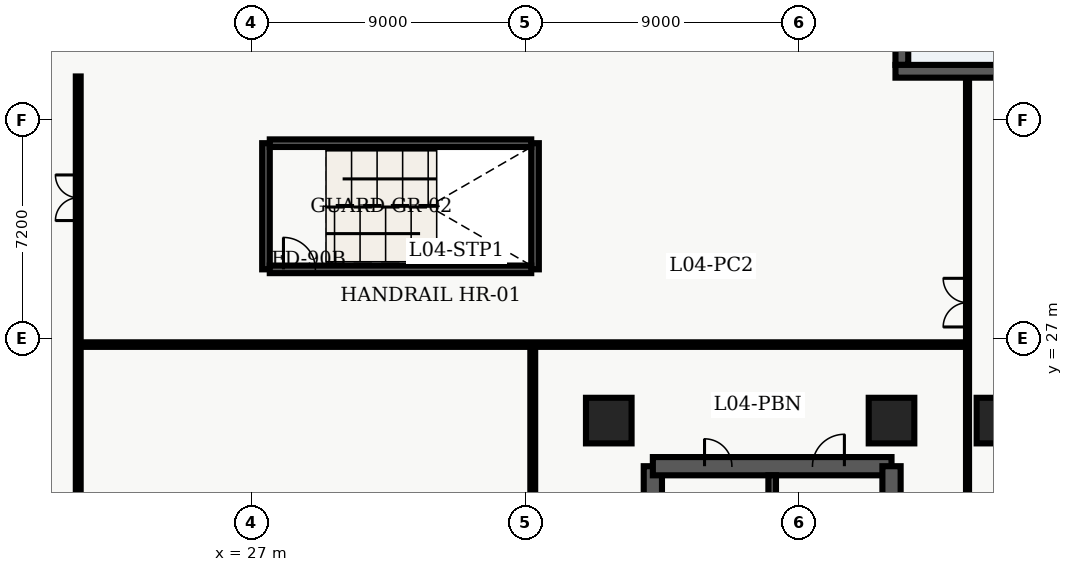
"""IFC4 building model, lengths in metres.
Left out: names, types, materials, properties, quantities, classifications, styles, units other than length and angle.
Written with IfcOpenShell. Run it as: python <this file> out.ifc"""

import sys

from ifc_helpers import new_model, entity, si_unit, converted_unit, direction, frame, origin_with_axes, origin_2d_with_axis, place, context, subcontext, project, spatial, polyline, rectangle, outline, extrude, element, fill, save


model = new_model("IFC4")
c1 = context("Model", 3, precision=1e-05, world=origin_with_axes(), true_north=direction((0.0, 1.0)))
c2 = subcontext(c1, "Body", "Model", "MODEL_VIEW")
j1 = project(units=[si_unit("LENGTHUNIT", "METRE"), converted_unit("PLANEANGLEUNIT", "DEGREE", entity("IfcPlaneAngleMeasure", 0.017), si_unit("PLANEANGLEUNIT", "RADIAN"), dimensions=[0, 0, 0, 0, 0, 0, 0])], contexts=[c1])
p1 = place(None, origin_with_axes())
s1 = spatial("IfcSite", under=j1, at=p1, CompositionType="ELEMENT")
p2 = place(p1, origin_with_axes())
s2 = spatial("IfcBuilding", under=s1, at=p2, CompositionType="ELEMENT")
p3 = place(p2, frame((0.0, 0.0, 19.8), z_axis=(0.0, 0.0, 1.0), x_axis=(1.0, 0.0, 0.0)))
s3 = spatial("IfcBuildingStorey", under=s2, at=p3, CompositionType="ELEMENT", Elevation=19.8)
p4 = place(p3, frame((40.2, 7.2, 0.0), z_axis=(0.0, 0.0, 1.0), x_axis=(0.0, 1.0, 0.0)))
e1 = element("IfcWall", 1, at=p4, inside=s3, PredefinedType="SHEAR", context=c2, shape_type="SweptSolid", body=[
    extrude(outline(polyline([(0.0, -0.3), (15.6, -0.3), (15.6, 0.3), (0.0, 0.3), (0.0, -0.3)])), origin_with_axes(), (0.0, 0.0, 1.0), 4.26),
])
p5 = place(p4, frame((12.75, 0.0, 0.0), z_axis=(0.0, 0.0, 1.0), x_axis=(1.0, 0.0, 0.0)))
e2 = element("IfcOpeningElement", 2, at=p5, cuts=e1, PredefinedType="OPENING", context=c2, shape_type="SweptSolid", body=[
    extrude(rectangle(XDim=1.2, YDim=0.62, at=origin_2d_with_axis()), origin_with_axes(), (0.0, 0.0, 1.0), 2.15),
])
p6 = place(p4, frame((9.3, 0.0, 0.0), z_axis=(0.0, 0.0, 1.0), x_axis=(1.0, 0.0, 0.0)))
e3 = element("IfcOpeningElement", 3, at=p6, cuts=e1, PredefinedType="OPENING", context=c2, shape_type="SweptSolid", body=[
    extrude(rectangle(XDim=0.9, YDim=0.62, at=origin_2d_with_axis()), origin_with_axes(), (0.0, 0.0, 1.0), 2.15),
])
p7 = place(p3, frame((40.2, 22.8, 0.0), z_axis=(0.0, 0.0, 1.0), x_axis=(1.0, 0.0, 0.0)))
e4 = element("IfcWall", 4, at=p7, inside=s3, PredefinedType="SHEAR", context=c2, shape_type="SweptSolid", body=[
    extrude(outline(polyline([(0.0, -0.3), (7.85, -0.3), (7.85, 0.3), (0.0, 0.3), (0.0, -0.3)])), origin_with_axes(), (0.0, 0.0, 1.0), 4.26),
])
p8 = place(p7, frame((5.775, 0.0, 0.0), z_axis=(0.0, 0.0, 1.0), x_axis=(1.0, 0.0, 0.0)))
e5 = element("IfcOpeningElement", 5, at=p8, cuts=e4, PredefinedType="OPENING", context=c2, shape_type="SweptSolid", body=[
    extrude(rectangle(XDim=1.05, YDim=0.62, at=origin_2d_with_axis()), origin_with_axes(), (0.0, 0.0, 1.0), 2.15),
])
p9 = place(p7, frame((2.15, 0.0, 0.0), z_axis=(0.0, 0.0, 1.0), x_axis=(1.0, 0.0, 0.0)))
e6 = element("IfcOpeningElement", 6, at=p9, cuts=e4, PredefinedType="OPENING", context=c2, shape_type="SweptSolid", body=[
    extrude(rectangle(XDim=0.9, YDim=0.62, at=origin_2d_with_axis()), origin_with_axes(), (0.0, 0.0, 1.0), 2.15),
])
p10 = place(p3, frame((48.05, 7.2, 0.0), z_axis=(0.0, 0.0, 1.0), x_axis=(0.0, 1.0, 0.0)))
e7 = element("IfcWall", 7, at=p10, inside=s3, PredefinedType="SHEAR", context=c2, shape_type="SweptSolid", body=[
    extrude(outline(polyline([(0.0, -0.3), (15.6, -0.3), (15.6, 0.3), (0.0, 0.3), (0.0, -0.3)])), origin_with_axes(), (0.0, 0.0, 1.0), 4.26),
])
p11 = place(p10, frame((1.425, 0.0, 0.0), z_axis=(0.0, 0.0, 1.0), x_axis=(1.0, 0.0, 0.0)))
e8 = element("IfcOpeningElement", 8, at=p11, cuts=e7, PredefinedType="OPENING", context=c2, shape_type="SweptSolid", body=[
    extrude(rectangle(XDim=1.05, YDim=0.62, at=origin_2d_with_axis()), origin_with_axes(), (0.0, 0.0, 1.0), 2.15),
])
p12 = place(p10, frame((3.475, 0.0, 0.0), z_axis=(0.0, 0.0, 1.0), x_axis=(1.0, 0.0, 0.0)))
e9 = element("IfcOpeningElement", 9, at=p12, cuts=e7, PredefinedType="OPENING", context=c2, shape_type="SweptSolid", body=[
    extrude(rectangle(XDim=1.05, YDim=0.62, at=origin_2d_with_axis()), origin_with_axes(), (0.0, 0.0, 1.0), 2.15),
])
p13 = place(p10, frame((5.625, 0.0, 0.0), z_axis=(0.0, 0.0, 1.0), x_axis=(1.0, 0.0, 0.0)))
e10 = element("IfcOpeningElement", 10, at=p13, cuts=e7, PredefinedType="OPENING", context=c2, shape_type="SweptSolid", body=[
    extrude(rectangle(XDim=0.95, YDim=0.62, at=origin_2d_with_axis()), origin_with_axes(), (0.0, 0.0, 1.0), 2.15),
])
p14 = place(p3, frame((44.125, 7.5, 0.0), z_axis=(0.0, 0.0, 1.0), x_axis=(0.0, 1.0, 0.0)))
e11 = element("IfcWall", 11, at=p14, inside=s3, PredefinedType="SHEAR", context=c2, shape_type="SweptSolid", body=[
    extrude(outline(polyline([(0.0, -0.125), (15.0, -0.125), (15.0, 0.125), (0.0, 0.125), (0.0, -0.125)])), origin_with_axes(), (0.0, 0.0, 1.0), 4.26),
])
for number, where, z_axis, x_axis in (
    (12, (27.475, 29.275, 0.0), (0.0, 0.0, 1.0), (0.0, 1.0, 0.0)),
    (13, (36.325, 29.275, 0.0), (0.0, 0.0, 1.0), (0.0, 1.0, 0.0)),
):
    element("IfcWall", number, at=place(p3, frame(where, z_axis=z_axis, x_axis=x_axis)), inside=s3, PredefinedType="SHEAR", context=c2, shape_type="SweptSolid", body=[
        extrude(outline(polyline([(0.0, -0.125), (4.15, -0.125), (4.15, 0.125), (0.0, 0.125), (0.0, -0.125)])), origin_with_axes(), (0.0, 0.0, 1.0), 4.26),
    ])
p15 = place(p3, frame((27.6, 29.275, 0.0), z_axis=(0.0, 0.0, 1.0), x_axis=(1.0, 0.0, 0.0)))
e14 = element("IfcWall", 14, at=p15, inside=s3, PredefinedType="SHEAR", context=c2, shape_type="SweptSolid", body=[
    extrude(outline(polyline([(0.0, -0.125), (8.6, -0.125), (8.6, 0.125), (0.0, 0.125), (0.0, -0.125)])), origin_with_axes(), (0.0, 0.0, 1.0), 4.26),
])
p16 = place(p15, frame((0.975, 0.0, 0.0), z_axis=(0.0, 0.0, 1.0), x_axis=(1.0, 0.0, 0.0)))
e15 = element("IfcOpeningElement", 15, at=p16, cuts=e14, PredefinedType="OPENING", context=c2, shape_type="SweptSolid", body=[
    extrude(rectangle(XDim=1.05, YDim=0.27, at=origin_2d_with_axis()), origin_with_axes(), (0.0, 0.0, 1.0), 2.15),
])
p17 = place(p3, frame((27.6, 33.425, 0.0), z_axis=(0.0, 0.0, 1.0), x_axis=(1.0, 0.0, 0.0)))
e16 = element("IfcWall", 16, at=p17, inside=s3, PredefinedType="SHEAR", context=c2, shape_type="SweptSolid", body=[
    extrude(outline(polyline([(0.0, -0.125), (8.6, -0.125), (8.6, 0.125), (0.0, 0.125), (0.0, -0.125)])), origin_with_axes(), (0.0, 0.0, 1.0), 4.26),
])
for number, where, z_axis, x_axis in (
    (17, (38.75, 24.3, 0.0), (0.0, 0.0, 1.0), (1.0, 0.0, 0.0)),
    (18, (48.05, 24.3, 0.0), (0.0, 0.0, 1.0), (1.0, 0.0, 0.0)),
    (19, (51.6, 24.3, 0.0), (0.0, 0.0, 1.0), (1.0, 0.0, 0.0)),
):
    element("IfcColumn", number, at=place(p3, frame(where, z_axis=z_axis, x_axis=x_axis)), inside=s3, PredefinedType="COLUMN", context=c2, shape_type="SweptSolid", body=[
        extrude(rectangle(XDim=1.5, YDim=1.5, at=origin_2d_with_axis()), origin_with_axes(), (0.0, 0.0, 1.0), 4.5),
    ])
p18 = place(p3, frame((21.3, 0.38, 0.0), z_axis=(0.0, 0.0, 1.0), x_axis=(0.0, 1.0, 0.0)))
e20 = element("IfcWall", 20, at=p18, inside=s3, PredefinedType="PARTITIONING", context=c2, shape_type="SweptSolid", body=[
    extrude(outline(polyline([(0.0, -0.08), (35.24, -0.08), (35.24, 0.08), (0.0, 0.08), (0.0, -0.08)])), origin_with_axes(), (0.0, 0.0, 1.0), 3.2),
])
p19 = place(p18, frame((13.025, 0.0, 0.0), z_axis=(0.0, 0.0, 1.0), x_axis=(1.0, 0.0, 0.0)))
e21 = element("IfcOpeningElement", 21, at=p19, cuts=e20, PredefinedType="OPENING", context=c2, shape_type="SweptSolid", body=[
    extrude(rectangle(XDim=1.05, YDim=0.18, at=origin_2d_with_axis()), origin_with_axes(), (0.0, 0.0, 1.0), 2.15),
])
p20 = place(p18, frame((31.25, 0.0, 0.0), z_axis=(0.0, 0.0, 1.0), x_axis=(1.0, 0.0, 0.0)))
e22 = element("IfcOpeningElement", 22, at=p20, cuts=e20, PredefinedType="OPENING", context=c2, shape_type="SweptSolid", body=[
    extrude(rectangle(XDim=1.5, YDim=0.18, at=origin_2d_with_axis()), origin_with_axes(), (0.0, 0.0, 1.0), 2.2),
])
p21 = place(p3, frame((36.25, 4.3, 0.0), z_axis=(0.0, 0.0, 1.0), x_axis=(0.0, 1.0, 0.0)))
e23 = element("IfcWall", 23, at=p21, inside=s3, PredefinedType="PARTITIONING", context=c2, shape_type="SweptSolid", body=[
    extrude(outline(polyline([(0.0, -0.08), (22.5, -0.08), (22.5, 0.08), (0.0, 0.08), (0.0, -0.08)])), origin_with_axes(), (0.0, 0.0, 1.0), 3.2),
])
p22 = place(p3, frame((50.55, 0.38, 0.0), z_axis=(0.0, 0.0, 1.0), x_axis=(0.0, 1.0, 0.0)))
e24 = element("IfcWall", 24, at=p22, inside=s3, PredefinedType="PARTITIONING", context=c2, shape_type="SweptSolid", body=[
    extrude(outline(polyline([(0.0, -0.05), (35.24, -0.05), (35.24, 0.05), (0.0, 0.05), (0.0, -0.05)])), origin_with_axes(), (0.0, 0.0, 1.0), 3.2),
])
p23 = place(p22, frame((12.8, 0.0, 0.0), z_axis=(0.0, 0.0, 1.0), x_axis=(1.0, 0.0, 0.0)))
e25 = element("IfcOpeningElement", 25, at=p23, cuts=e24, PredefinedType="OPENING", context=c2, shape_type="SweptSolid", body=[
    extrude(rectangle(XDim=1.6, YDim=0.12, at=origin_2d_with_axis()), origin_with_axes(), (0.0, 0.0, 1.0), 2.2),
])
p24 = place(p22, frame((27.8, 0.0, 0.0), z_axis=(0.0, 0.0, 1.0), x_axis=(1.0, 0.0, 0.0)))
e26 = element("IfcOpeningElement", 26, at=p24, cuts=e24, PredefinedType="OPENING", context=c2, shape_type="SweptSolid", body=[
    extrude(rectangle(XDim=1.6, YDim=0.12, at=origin_2d_with_axis()), origin_with_axes(), (0.0, 0.0, 1.0), 2.2),
])
p25 = place(p3, frame((21.3, 26.8, 0.0), z_axis=(0.0, 0.0, 1.0), x_axis=(1.0, 0.0, 0.0)))
e27 = element("IfcWall", 27, at=p25, inside=s3, PredefinedType="PARTITIONING", context=c2, shape_type="SweptSolid", body=[
    extrude(outline(polyline([(0.0, -0.075), (29.25, -0.075), (29.25, 0.075), (0.0, 0.075), (0.0, -0.075)])), origin_with_axes(), (0.0, 0.0, 1.0), 3.2),
])
p26 = place(p3, frame((48.39, 39.3, 0.0), z_axis=(0.0, 0.0, 1.0), x_axis=(0.0, -1.0, 0.0)))
e28 = element("IfcWall", 28, at=p26, inside=s3, PredefinedType="SOLIDWALL", context=c2, shape_type="SweptSolid", body=[
    extrude(outline(polyline([(0.0, -0.21), (3.3, -0.21), (3.3, 0.21), (0.0, 0.21), (0.0, -0.21)])), origin_with_axes(), (0.0, 0.0, 1.0), 4.26),
])
p27 = place(p3, frame((48.18, 35.79, 0.0), z_axis=(0.0, 0.0, 1.0), x_axis=(1.0, 0.0, 0.0)))
e29 = element("IfcWall", 29, at=p27, inside=s3, PredefinedType="SOLIDWALL", context=c2, shape_type="SweptSolid", body=[
    extrude(outline(polyline([(0.0, -0.21), (5.52, -0.21), (5.52, 0.21), (0.0, 0.21), (0.0, -0.21)])), origin_with_axes(), (0.0, 0.0, 1.0), 4.26),
])
p28 = place(p7, frame((5.775, 0.0, 0.0), z_axis=(0.0, 0.0, 1.0), x_axis=(1.0, 0.0, 0.0)))
e30 = element("IfcDoor", 30, at=p28, inside=s3, OperationType="SINGLE_SWING_RIGHT", PredefinedType="DOOR", context=c2, shape_type="SweptSolid", body=[
    extrude(rectangle(XDim=1.05, YDim=0.09, at=origin_2d_with_axis()), origin_with_axes(), (0.0, 0.0, 1.0), 2.15),
])
fill(e5, e30)
p29 = place(p7, frame((2.15, 0.0, 0.0), z_axis=(0.0, 0.0, 1.0), x_axis=(1.0, 0.0, 0.0)))
e31 = element("IfcDoor", 31, at=p29, inside=s3, OperationType="SINGLE_SWING_LEFT", PredefinedType="DOOR", context=c2, shape_type="SweptSolid", body=[
    extrude(rectangle(XDim=0.9, YDim=0.09, at=origin_2d_with_axis()), origin_with_axes(), (0.0, 0.0, 1.0), 2.15),
])
fill(e6, e31)
p30 = place(p15, frame((0.975, 0.0, 0.0), z_axis=(0.0, 0.0, 1.0), x_axis=(1.0, 0.0, 0.0)))
e32 = element("IfcDoor", 32, at=p30, inside=s3, OperationType="SINGLE_SWING_LEFT", PredefinedType="DOOR", context=c2, shape_type="SweptSolid", body=[
    extrude(rectangle(XDim=1.05, YDim=0.09, at=origin_2d_with_axis()), origin_with_axes(), (0.0, 0.0, 1.0), 2.15),
])
fill(e15, e32)
p31 = place(p18, frame((31.25, 0.0, 0.0), z_axis=(0.0, 0.0, 1.0), x_axis=(1.0, 0.0, 0.0)))
e33 = element("IfcDoor", 33, at=p31, inside=s3, OperationType="DOUBLE_DOOR_SINGLE_SWING", PredefinedType="DOOR", context=c2, shape_type="SweptSolid", body=[
    extrude(rectangle(XDim=1.5, YDim=0.09, at=origin_2d_with_axis()), origin_with_axes(), (0.0, 0.0, 1.0), 2.2),
])
fill(e22, e33)
p32 = place(p22, frame((27.8, 0.0, 0.0), z_axis=(0.0, 0.0, 1.0), x_axis=(1.0, 0.0, 0.0)))
e34 = element("IfcDoor", 34, at=p32, inside=s3, OperationType="DOUBLE_DOOR_SINGLE_SWING", PredefinedType="DOOR", context=c2, shape_type="SweptSolid", body=[
    extrude(rectangle(XDim=1.6, YDim=0.06, at=origin_2d_with_axis()), origin_with_axes(), (0.0, 0.0, 1.0), 2.2),
])
fill(e26, e34)
save(model, sys.argv[1])
